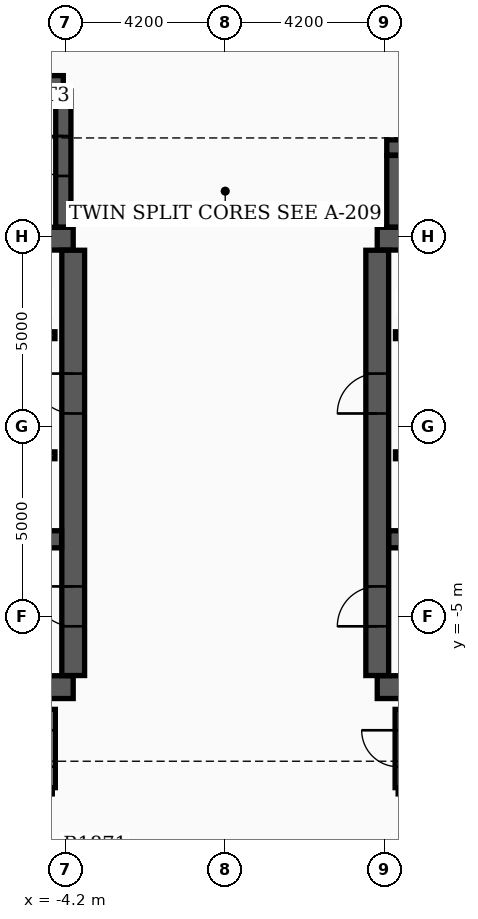
"""IFC4 building model, lengths in metres.
Left out: names, types, materials, properties, quantities, classifications, styles, units other than length and angle.
Written with IfcOpenShell. Run it as: python <this file> out.ifc"""

import sys

from ifc_helpers import new_model, si_unit, direction, frame, frame_2d, origin, place, context, subcontext, project, spatial, rectangle, extrude, element, fill, save


model = new_model("IFC4")
c1 = context("Model", 3, precision=1e-05, world=origin(), true_north=direction((0.0, 1.0)))
c2 = subcontext(c1, "Body", "Model", "MODEL_VIEW")
j1 = project(units=[si_unit("LENGTHUNIT", "METRE"), si_unit("PLANEANGLEUNIT", "RADIAN")], contexts=[c1])
p1 = place(None, origin())
s1 = spatial("IfcSite", under=j1, at=p1, CompositionType="ELEMENT")
p2 = place(p1, origin())
s2 = spatial("IfcBuilding", under=s1, at=p2, CompositionType="ELEMENT")
p3 = place(p2, frame((0.0, 0.0, 120.3)))
s3 = spatial("IfcBuildingStorey", under=s2, at=p3, CompositionType="ELEMENT", Elevation=120.3)
for number, where, z_axis, x_axis in (
    (1, (-12.4, -6.85, 0.0), (0.0, 0.0, 1.0), (1.0, 0.0, 0.0)),
    (2, (-12.4, 4.95, 0.0), (0.0, 0.0, 1.0), (1.0, 0.0, 0.0)),
):
    element("IfcWall", number, at=place(p3, frame(where, z_axis=z_axis, x_axis=x_axis)), inside=s3, PredefinedType="SHEAR", context=c2, shape_type="SweptSolid", body=[
        extrude(rectangle(XDim=8.4, YDim=0.6, at=frame_2d((4.2, 0.0))), origin(), (0.0, 0.0, 1.0), 3.7),
    ])
p4 = place(p3, frame((-4.0, -6.545, 0.0), z_axis=(0.0, 0.0, 1.0), x_axis=(0.0, 1.0, 0.0)))
e3 = element("IfcWall", 3, at=p4, inside=s3, PredefinedType="SHEAR", context=c2, shape_type="SweptSolid", body=[
    extrude(rectangle(XDim=11.19, YDim=0.6, at=frame_2d((5.595, 0.0))), origin(), (0.0, 0.0, 1.0), 3.7),
])
p5 = place(p4, frame((1.295, 0.0, 0.0)))
e4 = element("IfcOpeningElement", 4, at=p5, cuts=e3, PredefinedType="OPENING", context=c2, shape_type="SweptSolid", body=[
    extrude(rectangle(XDim=1.05, YDim=2.15, at=frame_2d((0.525, 1.075))), frame((0.0, 0.31, 0.0), z_axis=(0.0, -1.0, 0.0), x_axis=(1.0, 0.0, 0.0)), (0.0, 0.0, 1.0), 0.62),
])
p6 = place(p4, frame((6.895, 0.0, 0.0)))
e5 = element("IfcOpeningElement", 5, at=p6, cuts=e3, PredefinedType="OPENING", context=c2, shape_type="SweptSolid", body=[
    extrude(rectangle(XDim=1.05, YDim=2.15, at=frame_2d((0.525, 1.075))), frame((0.0, 0.31, 0.0), z_axis=(0.0, -1.0, 0.0), x_axis=(1.0, 0.0, 0.0)), (0.0, 0.0, 1.0), 0.62),
])
p7 = place(p3, frame((-12.095, -2.96, 0.0), z_axis=(0.0, 0.0, 1.0), x_axis=(1.0, 0.0, 0.0)))
e6 = element("IfcWall", 6, at=p7, inside=s3, PredefinedType="SHEAR", context=c2, shape_type="SweptSolid", body=[
    extrude(rectangle(XDim=7.79, YDim=0.45, at=frame_2d((3.895, 0.0))), origin(), (0.0, 0.0, 1.0), 3.7),
])
for number, where, z_axis, x_axis in (
    (7, (4.0, -6.85, 0.0), (0.0, 0.0, 1.0), (1.0, 0.0, 0.0)),
    (8, (4.0, 4.95, 0.0), (0.0, 0.0, 1.0), (1.0, 0.0, 0.0)),
):
    element("IfcWall", number, at=place(p3, frame(where, z_axis=z_axis, x_axis=x_axis)), inside=s3, PredefinedType="SHEAR", context=c2, shape_type="SweptSolid", body=[
        extrude(rectangle(XDim=8.4, YDim=0.6, at=frame_2d((4.2, 0.0))), origin(), (0.0, 0.0, 1.0), 3.7),
    ])
p8 = place(p3, frame((4.0, -6.545, 0.0), z_axis=(0.0, 0.0, 1.0), x_axis=(0.0, 1.0, 0.0)))
e9 = element("IfcWall", 9, at=p8, inside=s3, PredefinedType="SHEAR", context=c2, shape_type="SweptSolid", body=[
    extrude(rectangle(XDim=11.19, YDim=0.6, at=frame_2d((5.595, 0.0))), origin(), (0.0, 0.0, 1.0), 3.7),
])
p9 = place(p8, frame((1.295, 0.0, 0.0)))
e10 = element("IfcOpeningElement", 10, at=p9, cuts=e9, PredefinedType="OPENING", context=c2, shape_type="SweptSolid", body=[
    extrude(rectangle(XDim=1.05, YDim=2.15, at=frame_2d((0.525, 1.075))), frame((0.0, 0.31, 0.0), z_axis=(0.0, -1.0, 0.0), x_axis=(1.0, 0.0, 0.0)), (0.0, 0.0, 1.0), 0.62),
])
p10 = place(p8, frame((6.895, 0.0, 0.0)))
e11 = element("IfcOpeningElement", 11, at=p10, cuts=e9, PredefinedType="OPENING", context=c2, shape_type="SweptSolid", body=[
    extrude(rectangle(XDim=1.05, YDim=2.15, at=frame_2d((0.525, 1.075))), frame((0.0, 0.31, 0.0), z_axis=(0.0, -1.0, 0.0), x_axis=(1.0, 0.0, 0.0)), (0.0, 0.0, 1.0), 0.62),
])
p11 = place(p3, frame((4.305, -2.96, 0.0), z_axis=(0.0, 0.0, 1.0), x_axis=(1.0, 0.0, 0.0)))
e12 = element("IfcWall", 12, at=p11, inside=s3, PredefinedType="SHEAR", context=c2, shape_type="SweptSolid", body=[
    extrude(rectangle(XDim=7.79, YDim=0.45, at=frame_2d((3.895, 0.0))), origin(), (0.0, 0.0, 1.0), 3.7),
])
p12 = place(p3, frame((-12.22, 9.04, 0.0), z_axis=(0.0, 0.0, 1.0), x_axis=(1.0, 0.0, 0.0)))
e13 = element("IfcWall", 13, at=p12, inside=s3, PredefinedType="SHEAR", context=c2, shape_type="SweptSolid", body=[
    extrude(rectangle(XDim=7.96, YDim=0.4, at=frame_2d((3.98, 0.0))), origin(), (0.0, 0.0, 1.0), 3.7),
])
p13 = place(p3, frame((-4.26, 5.255, 0.0), z_axis=(0.0, 0.0, 1.0), x_axis=(0.0, 1.0, 0.0)))
e14 = element("IfcWall", 14, at=p13, inside=s3, PredefinedType="SHEAR", context=c2, shape_type="SweptSolid", body=[
    extrude(rectangle(XDim=3.58, YDim=0.4, at=frame_2d((1.79, 0.0))), origin(), (0.0, 0.0, 1.0), 3.7),
])
p14 = place(p13, frame((1.345, 0.0, 0.0)))
e15 = element("IfcOpeningElement", 15, at=p14, cuts=e14, PredefinedType="OPENING", context=c2, shape_type="SweptSolid", body=[
    extrude(rectangle(XDim=1.05, YDim=2.15, at=frame_2d((0.525, 1.075))), frame((0.0, 0.21, 0.0), z_axis=(0.0, -1.0, 0.0), x_axis=(1.0, 0.0, 0.0)), (0.0, 0.0, 1.0), 0.42),
])
p15 = place(p3, frame((4.45, 5.255, 0.0), z_axis=(0.0, 0.0, 1.0), x_axis=(0.0, 1.0, 0.0)))
e16 = element("IfcWall", 16, at=p15, inside=s3, PredefinedType="SHEAR", context=c2, shape_type="SweptSolid", body=[
    extrude(rectangle(XDim=1.885, YDim=0.4, at=frame_2d((0.942, 0.0))), origin(), (0.0, 0.0, 1.0), 3.7),
])
p16 = place(p3, frame((4.25, 7.35, 0.0), z_axis=(0.0, 0.0, 1.0), x_axis=(1.0, 0.0, 0.0)))
e17 = element("IfcWall", 17, at=p16, inside=s3, PredefinedType="SHEAR", context=c2, shape_type="SweptSolid", body=[
    extrude(rectangle(XDim=5.4, YDim=0.4, at=frame_2d((2.7, 0.0))), origin(), (0.0, 0.0, 1.0), 3.7),
])
p17 = place(p3, frame((-11.9, 2.41, 0.0), z_axis=(0.0, 0.0, 1.0), x_axis=(1.0, 0.0, 0.0)))
e18 = element("IfcWall", 18, at=p17, inside=s3, PredefinedType="SOLIDWALL", context=c2, shape_type="SweptSolid", body=[
    extrude(rectangle(XDim=7.42, YDim=0.18, at=frame_2d((3.71, 0.0))), origin(), (0.0, 0.0, 1.0), 2.96),
])
p18 = place(p17, frame((0.55, 0.0, 0.0)))
e19 = element("IfcOpeningElement", 19, at=p18, cuts=e18, PredefinedType="OPENING", context=c2, shape_type="SweptSolid", body=[
    extrude(rectangle(XDim=1.1, YDim=2.15, at=frame_2d((0.55, 1.075))), frame((0.0, 0.1, 0.0), z_axis=(0.0, -1.0, 0.0), x_axis=(1.0, 0.0, 0.0)), (0.0, 0.0, 1.0), 0.2),
])
p19 = place(p17, frame((4.9, 0.0, 0.0)))
e20 = element("IfcOpeningElement", 20, at=p19, cuts=e18, PredefinedType="OPENING", context=c2, shape_type="SweptSolid", body=[
    extrude(rectangle(XDim=0.88, YDim=2.1, at=frame_2d((0.44, 1.05))), frame((0.0, 0.1, 0.0), z_axis=(0.0, -1.0, 0.0), x_axis=(1.0, 0.0, 0.0)), (0.0, 0.0, 1.0), 0.2),
])
p20 = place(p3, frame((4.48, 2.41, 0.0), z_axis=(0.0, 0.0, 1.0), x_axis=(1.0, 0.0, 0.0)))
e21 = element("IfcWall", 21, at=p20, inside=s3, PredefinedType="SOLIDWALL", context=c2, shape_type="SweptSolid", body=[
    extrude(rectangle(XDim=7.42, YDim=0.18, at=frame_2d((3.71, 0.0))), origin(), (0.0, 0.0, 1.0), 2.96),
])
p21 = place(p20, frame((5.67, 0.0, 0.0)))
e22 = element("IfcOpeningElement", 22, at=p21, cuts=e21, PredefinedType="OPENING", context=c2, shape_type="SweptSolid", body=[
    extrude(rectangle(XDim=1.1, YDim=2.15, at=frame_2d((0.55, 1.075))), frame((0.0, 0.1, 0.0), z_axis=(0.0, -1.0, 0.0), x_axis=(1.0, 0.0, 0.0)), (0.0, 0.0, 1.0), 0.2),
])
p22 = place(p20, frame((1.6, 0.0, 0.0)))
e23 = element("IfcOpeningElement", 23, at=p22, cuts=e21, PredefinedType="OPENING", context=c2, shape_type="SweptSolid", body=[
    extrude(rectangle(XDim=0.88, YDim=2.1, at=frame_2d((0.44, 1.05))), frame((0.0, 0.1, 0.0), z_axis=(0.0, -1.0, 0.0), x_axis=(1.0, 0.0, 0.0)), (0.0, 0.0, 1.0), 0.2),
])
p23 = place(p3, frame((-11.9, -0.75, 0.0), z_axis=(0.0, 0.0, 1.0), x_axis=(1.0, 0.0, 0.0)))
e24 = element("IfcWall", 24, at=p23, inside=s3, PredefinedType="SOLIDWALL", context=c2, shape_type="SweptSolid", body=[
    extrude(rectangle(XDim=7.42, YDim=0.18, at=frame_2d((3.71, 0.0))), origin(), (0.0, 0.0, 1.0), 2.96),
])
p24 = place(p23, frame((0.45, 0.0, 0.0)))
e25 = element("IfcOpeningElement", 25, at=p24, cuts=e24, PredefinedType="OPENING", context=c2, shape_type="SweptSolid", body=[
    extrude(rectangle(XDim=1.1, YDim=2.15, at=frame_2d((0.55, 1.075))), frame((0.0, 0.1, 0.0), z_axis=(0.0, -1.0, 0.0), x_axis=(1.0, 0.0, 0.0)), (0.0, 0.0, 1.0), 0.2),
])
p25 = place(p23, frame((2.35, 0.0, 0.0)))
e26 = element("IfcOpeningElement", 26, at=p25, cuts=e24, PredefinedType="OPENING", context=c2, shape_type="SweptSolid", body=[
    extrude(rectangle(XDim=1.1, YDim=2.15, at=frame_2d((0.55, 1.075))), frame((0.0, 0.1, 0.0), z_axis=(0.0, -1.0, 0.0), x_axis=(1.0, 0.0, 0.0)), (0.0, 0.0, 1.0), 0.2),
])
p26 = place(p3, frame((4.48, -0.75, 0.0), z_axis=(0.0, 0.0, 1.0), x_axis=(1.0, 0.0, 0.0)))
e27 = element("IfcWall", 27, at=p26, inside=s3, PredefinedType="SOLIDWALL", context=c2, shape_type="SweptSolid", body=[
    extrude(rectangle(XDim=7.42, YDim=0.18, at=frame_2d((3.71, 0.0))), origin(), (0.0, 0.0, 1.0), 2.96),
])
p27 = place(p26, frame((0.52, 0.0, 0.0)))
e28 = element("IfcOpeningElement", 28, at=p27, cuts=e27, PredefinedType="OPENING", context=c2, shape_type="SweptSolid", body=[
    extrude(rectangle(XDim=1.1, YDim=2.15, at=frame_2d((0.55, 1.075))), frame((0.0, 0.1, 0.0), z_axis=(0.0, -1.0, 0.0), x_axis=(1.0, 0.0, 0.0)), (0.0, 0.0, 1.0), 0.2),
])
p28 = place(p3, frame((4.55, -9.58, 0.0), z_axis=(0.0, 0.0, 1.0), x_axis=(1.0, 0.0, 0.0)))
e29 = element("IfcWall", 29, at=p28, inside=s3, PredefinedType="PARTITIONING", context=c2, shape_type="SweptSolid", body=[
    extrude(rectangle(XDim=8.1, YDim=0.16, at=frame_2d((4.05, 0.0))), origin(), (0.0, 0.0, 1.0), 2.96),
])
p29 = place(p3, frame((4.55, -9.495, 0.0), z_axis=(0.0, 0.0, 1.0), x_axis=(0.0, 1.0, 0.0)))
e30 = element("IfcWall", 30, at=p29, inside=s3, PredefinedType="PARTITIONING", context=c2, shape_type="SweptSolid", body=[
    extrude(rectangle(XDim=2.06, YDim=0.16, at=frame_2d((1.03, 0.0))), origin(), (0.0, 0.0, 1.0), 2.96),
])
p30 = place(p29, frame((0.55, 0.0, 0.0)))
e31 = element("IfcOpeningElement", 31, at=p30, cuts=e30, PredefinedType="OPENING", context=c2, shape_type="SweptSolid", body=[
    extrude(rectangle(XDim=0.96, YDim=2.15, at=frame_2d((0.48, 1.075))), frame((0.0, 0.09, 0.0), z_axis=(0.0, -1.0, 0.0), x_axis=(1.0, 0.0, 0.0)), (0.0, 0.0, 1.0), 0.18),
])
p31 = place(p3, frame((-4.55, -9.495, 0.0), z_axis=(0.0, 0.0, 1.0), x_axis=(0.0, 1.0, 0.0)))
e32 = element("IfcWall", 32, at=p31, inside=s3, PredefinedType="PARTITIONING", context=c2, shape_type="SweptSolid", body=[
    extrude(rectangle(XDim=2.06, YDim=0.16, at=frame_2d((1.03, 0.0))), origin(), (0.0, 0.0, 1.0), 2.96),
])
p32 = place(p31, frame((0.55, 0.0, 0.0)))
e33 = element("IfcOpeningElement", 33, at=p32, cuts=e32, PredefinedType="OPENING", context=c2, shape_type="SweptSolid", body=[
    extrude(rectangle(XDim=0.96, YDim=2.15, at=frame_2d((0.48, 1.075))), frame((0.0, 0.09, 0.0), z_axis=(0.0, -1.0, 0.0), x_axis=(1.0, 0.0, 0.0)), (0.0, 0.0, 1.0), 0.18),
])
p33 = place(p5, origin())
e34 = element("IfcDoor", 34, at=p33, inside=s3, OperationType="SINGLE_SWING_RIGHT", PredefinedType="DOOR", context=c2, shape_type="SweptSolid", body=[
    extrude(rectangle(XDim=1.05, YDim=2.15, at=frame_2d((0.525, 1.075))), frame((0.0, 0.025, 0.0), z_axis=(0.0, -1.0, 0.0), x_axis=(1.0, 0.0, 0.0)), (0.0, 0.0, 1.0), 0.05),
])
fill(e4, e34)
p34 = place(p9, origin())
e35 = element("IfcDoor", 35, at=p34, inside=s3, OperationType="SINGLE_SWING_LEFT", PredefinedType="DOOR", context=c2, shape_type="SweptSolid", body=[
    extrude(rectangle(XDim=1.05, YDim=2.15, at=frame_2d((0.525, 1.075))), frame((0.0, 0.025, 0.0), z_axis=(0.0, -1.0, 0.0), x_axis=(1.0, 0.0, 0.0)), (0.0, 0.0, 1.0), 0.05),
])
fill(e10, e35)
p35 = place(p6, origin())
e36 = element("IfcDoor", 36, at=p35, inside=s3, OperationType="SINGLE_SWING_RIGHT", PredefinedType="DOOR", context=c2, shape_type="SweptSolid", body=[
    extrude(rectangle(XDim=1.05, YDim=2.15, at=frame_2d((0.525, 1.075))), frame((0.0, 0.025, 0.0), z_axis=(0.0, -1.0, 0.0), x_axis=(1.0, 0.0, 0.0)), (0.0, 0.0, 1.0), 0.05),
])
fill(e5, e36)
p36 = place(p10, origin())
e37 = element("IfcDoor", 37, at=p36, inside=s3, OperationType="SINGLE_SWING_LEFT", PredefinedType="DOOR", context=c2, shape_type="SweptSolid", body=[
    extrude(rectangle(XDim=1.05, YDim=2.15, at=frame_2d((0.525, 1.075))), frame((0.0, 0.025, 0.0), z_axis=(0.0, -1.0, 0.0), x_axis=(1.0, 0.0, 0.0)), (0.0, 0.0, 1.0), 0.05),
])
fill(e11, e37)
p37 = place(p14, origin())
e38 = element("IfcDoor", 38, at=p37, inside=s3, OperationType="SINGLE_SWING_RIGHT", PredefinedType="DOOR", context=c2, shape_type="SweptSolid", body=[
    extrude(rectangle(XDim=1.05, YDim=2.15, at=frame_2d((0.525, 1.075))), frame((0.0, 0.025, 0.0), z_axis=(0.0, -1.0, 0.0), x_axis=(1.0, 0.0, 0.0)), (0.0, 0.0, 1.0), 0.05),
])
fill(e15, e38)
p38 = place(p30, origin())
e39 = element("IfcDoor", 39, at=p38, inside=s3, OperationType="SINGLE_SWING_RIGHT", PredefinedType="DOOR", context=c2, shape_type="SweptSolid", body=[
    extrude(rectangle(XDim=0.96, YDim=2.15, at=frame_2d((0.48, 1.075))), frame((0.0, 0.025, 0.0), z_axis=(0.0, -1.0, 0.0), x_axis=(1.0, 0.0, 0.0)), (0.0, 0.0, 1.0), 0.05),
])
fill(e31, e39)
p39 = place(p32, origin())
e40 = element("IfcDoor", 40, at=p39, inside=s3, OperationType="SINGLE_SWING_LEFT", PredefinedType="DOOR", context=c2, shape_type="SweptSolid", body=[
    extrude(rectangle(XDim=0.96, YDim=2.15, at=frame_2d((0.48, 1.075))), frame((0.0, 0.025, 0.0), z_axis=(0.0, -1.0, 0.0), x_axis=(1.0, 0.0, 0.0)), (0.0, 0.0, 1.0), 0.05),
])
fill(e33, e40)
save(model, sys.argv[1])
